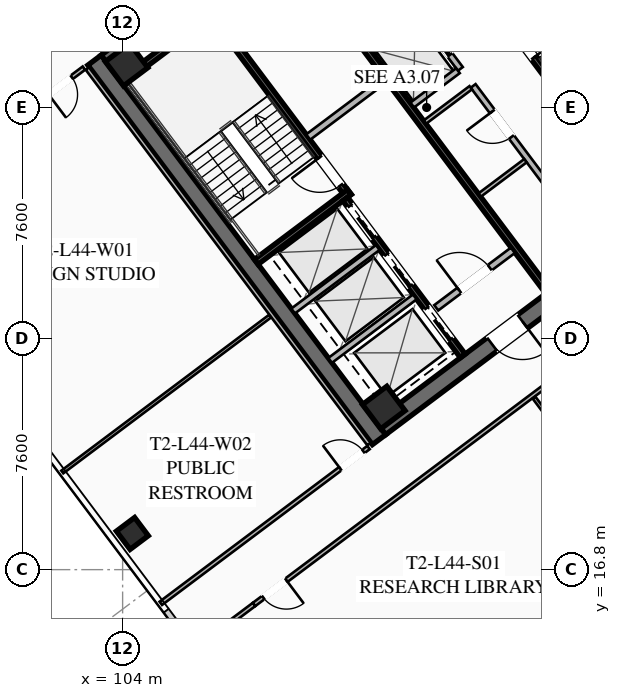
"""IFC4 building model, lengths in metres.
Left out: names, types, materials, properties, quantities, classifications, styles, units other than length and angle.
Written with IfcOpenShell. Run it as: python <this file> out.ifc"""

import sys

from ifc_helpers import new_model, si_unit, direction, frame, frame_2d, origin, origin_2d, place, context, subcontext, project, spatial, rectangle, hollow_rectangle, extrude, element, fill, save


model = new_model("IFC4")
c1 = context("Model", 3, precision=1e-05, world=origin(), true_north=direction((0.0, 1.0)))
c2 = subcontext(c1, "Body", "Model", "MODEL_VIEW")
j1 = project(units=[si_unit("LENGTHUNIT", "METRE"), si_unit("PLANEANGLEUNIT", "RADIAN")], contexts=[c1])
p1 = place(None, origin())
s1 = spatial("IfcSite", under=j1, at=p1, CompositionType="ELEMENT")
p2 = place(p1, origin())
s2 = spatial("IfcBuilding", under=s1, at=p2, CompositionType="ELEMENT")
p3 = place(p2, frame((0.0, 0.0, 164.1)))
s3 = spatial("IfcBuildingStorey", under=s2, at=p3, CompositionType="ELEMENT", Elevation=164.1)
for number, where, z_axis, x_axis in (
    (1, (112.436, 21.077, 0.0), (0.0, 0.0, 1.0), (-0.6, 0.8, 0.0)),
    (2, (115.564, 42.923, 0.0), (0.0, 0.0, 1.0), (0.6, -0.8, 0.0)),
):
    element("IfcWall", number, at=place(p3, frame(where, z_axis=z_axis, x_axis=x_axis)), inside=s3, PredefinedType="SHEAR", context=c2, shape_type="SweptSolid", body=[
        extrude(rectangle(XDim=15.6, YDim=0.55, at=frame_2d((7.8, 0.0))), origin(), (0.0, 0.0, 1.0), 3.55),
    ])
p4 = place(p3, frame((124.539, 30.498, 0.0), z_axis=(0.0, 0.0, 1.0), x_axis=(-0.799998054672, -0.600002593761, 0.0)))
e3 = element("IfcWall", 3, at=p4, inside=s3, PredefinedType="SHEAR", context=c2, shape_type="SweptSolid", body=[
    extrude(rectangle(XDim=15.06, YDim=0.55, at=frame_2d((7.53, 0.0))), origin(), (0.0, 0.0, 1.0), 3.55),
])
p5 = place(p4, frame((9.23, 0.0, 0.0)))
e4 = element("IfcOpeningElement", 4, at=p5, cuts=e3, PredefinedType="OPENING", context=c2, shape_type="SweptSolid", body=[
    extrude(rectangle(XDim=1.25, YDim=2.25, at=frame_2d((0.625, 1.125))), frame((0.0, 0.285, 0.0), z_axis=(0.0, -1.0, 0.0), x_axis=(1.0, 0.0, 0.0)), (0.0, 0.0, 1.0), 0.57),
])
p6 = place(p4, frame((4.18, 0.0, 0.0)))
e5 = element("IfcOpeningElement", 5, at=p6, cuts=e3, PredefinedType="OPENING", context=c2, shape_type="SweptSolid", body=[
    extrude(rectangle(XDim=1.25, YDim=2.25, at=frame_2d((0.625, 1.125))), frame((0.0, 0.285, 0.0), z_axis=(0.0, -1.0, 0.0), x_axis=(1.0, 0.0, 0.0)), (0.0, 0.0, 1.0), 0.57),
])
p7 = place(p3, frame((103.461, 33.502, 0.0), z_axis=(0.0, 0.0, 1.0), x_axis=(0.799998054672, 0.600002593761, 0.0)))
e6 = element("IfcWall", 6, at=p7, inside=s3, PredefinedType="SHEAR", context=c2, shape_type="SweptSolid", body=[
    extrude(rectangle(XDim=15.06, YDim=0.55, at=frame_2d((7.53, 0.0))), origin(), (0.0, 0.0, 1.0), 3.55),
])
p8 = place(p7, frame((4.58, 0.0, 0.0)))
e7 = element("IfcOpeningElement", 7, at=p8, cuts=e6, PredefinedType="OPENING", context=c2, shape_type="SweptSolid", body=[
    extrude(rectangle(XDim=1.25, YDim=2.25, at=frame_2d((0.625, 1.125))), frame((0.0, 0.285, 0.0), z_axis=(0.0, -1.0, 0.0), x_axis=(1.0, 0.0, 0.0)), (0.0, 0.0, 1.0), 0.57),
])
p9 = place(p7, frame((9.63, 0.0, 0.0)))
e8 = element("IfcOpeningElement", 8, at=p9, cuts=e6, PredefinedType="OPENING", context=c2, shape_type="SweptSolid", body=[
    extrude(rectangle(XDim=1.25, YDim=2.25, at=frame_2d((0.625, 1.125))), frame((0.0, 0.285, 0.0), z_axis=(0.0, -1.0, 0.0), x_axis=(1.0, 0.0, 0.0)), (0.0, 0.0, 1.0), 0.57),
])
for number, where, z_axis, x_axis in (
    (9, (112.59, 22.13, 0.0), (0.0, 0.0, 1.0), (0.8, 0.6, 0.0)),
    (10, (104.13, 33.41, 0.0), (0.0, 0.0, 1.0), (0.8, 0.6, 0.0)),
):
    element("IfcColumn", number, at=place(p3, frame(where, z_axis=z_axis, x_axis=x_axis)), inside=s3, PredefinedType="COLUMN", context=c2, shape_type="SweptSolid", body=[
        extrude(hollow_rectangle(XDim=1.0, YDim=1.0, WallThickness=0.04, at=origin_2d()), origin(), (0.0, 0.0, 1.0), 3.37),
    ])
p10 = place(p3, frame((104.32, 17.99, 0.0), z_axis=(0.0, 0.0, 1.0), x_axis=(0.799999996291, 0.600000004945, 0.0)))
e11 = element("IfcColumn", 11, at=p10, inside=s3, PredefinedType="COLUMN", context=c2, shape_type="SweptSolid", body=[
    extrude(hollow_rectangle(XDim=0.75, YDim=0.75, WallThickness=0.032, at=origin_2d()), origin(), (0.0, 0.0, 1.0), 3.37),
])
p11 = place(p3, frame((111.44, 29.08, 0.0), z_axis=(0.0, 0.0, 1.0), x_axis=(-0.59999029481, 0.8000072788, 0.0)))
e12 = element("IfcWall", 12, at=p11, inside=s3, PredefinedType="SHEAR", context=c2, shape_type="SweptSolid", body=[
    extrude(rectangle(XDim=8.05, YDim=0.2, at=frame_2d((4.025, 0.0))), origin(), (0.0, 0.0, 1.0), 3.37),
])
p12 = place(p11, frame((0.45, 0.0, 0.0)))
e13 = element("IfcOpeningElement", 13, at=p12, cuts=e12, PredefinedType="OPENING", context=c2, shape_type="SweptSolid", body=[
    extrude(rectangle(XDim=1.15, YDim=2.2, at=frame_2d((0.575, 1.1))), frame((0.0, 0.11, 0.0), z_axis=(0.0, -1.0, 0.0), x_axis=(1.0, 0.0, 0.0)), (0.0, 0.0, 1.0), 0.22),
])
for number, where, z_axis, x_axis in (
    (14, (108.396, 26.922, 0.0), (0.0, 0.0, 1.0), (0.8, 0.6, 0.0)),
    (15, (103.956, 32.842, 0.0), (0.0, 0.0, 1.0), (0.8, 0.6, 0.0)),
):
    element("IfcWall", number, at=place(p3, frame(where, z_axis=z_axis, x_axis=x_axis)), inside=s3, PredefinedType="SHEAR", context=c2, shape_type="SweptSolid", body=[
        extrude(rectangle(XDim=3.83, YDim=0.2, at=frame_2d((1.915, 0.0))), origin(), (0.0, 0.0, 1.0), 3.37),
    ])
p13 = place(p3, frame((116.56, 34.92, 0.0), z_axis=(0.0, 0.0, 1.0), x_axis=(0.59999029481, -0.8000072788, 0.0)))
e16 = element("IfcWall", 16, at=p13, inside=s3, PredefinedType="SHEAR", context=c2, shape_type="SweptSolid", body=[
    extrude(rectangle(XDim=8.05, YDim=0.2, at=frame_2d((4.025, 0.0))), origin(), (0.0, 0.0, 1.0), 3.37),
])
p14 = place(p13, frame((0.45, 0.0, 0.0)))
e17 = element("IfcOpeningElement", 17, at=p14, cuts=e16, PredefinedType="OPENING", context=c2, shape_type="SweptSolid", body=[
    extrude(rectangle(XDim=1.15, YDim=2.2, at=frame_2d((0.575, 1.1))), frame((0.0, 0.11, 0.0), z_axis=(0.0, -1.0, 0.0), x_axis=(1.0, 0.0, 0.0)), (0.0, 0.0, 1.0), 0.22),
])
p15 = place(p3, frame((117.998, 25.936, 0.0), z_axis=(0.0, 0.0, 1.0), x_axis=(-0.600002693989, 0.799997979501, 0.0)))
e18 = element("IfcWall", 18, at=p15, inside=s3, PredefinedType="SHEAR", context=c2, shape_type="SweptSolid", body=[
    extrude(rectangle(XDim=14.5, YDim=0.2, at=frame_2d((7.25, 0.0))), origin(), (0.0, 0.0, 1.0), 3.37),
])
p16 = place(p3, frame((110.104, 31.028, 0.0), z_axis=(0.0, 0.0, 1.0), x_axis=(0.800018601094, 0.59997519774, 0.0)))
e19 = element("IfcWall", 19, at=p16, inside=s3, PredefinedType="SOLIDWALL", context=c2, shape_type="SweptSolid", body=[
    extrude(rectangle(XDim=3.15, YDim=0.22, at=frame_2d((1.575, 0.0))), origin(), (0.0, 0.0, 1.0), 2.723),
])
p17 = place(p3, frame((114.316, 25.412, 0.0), z_axis=(0.0, 0.0, 1.0), x_axis=(0.800018601094, 0.59997519774, 0.0)))
e20 = element("IfcWall", 20, at=p17, inside=s3, PredefinedType="SOLIDWALL", context=c2, shape_type="SweptSolid", body=[
    extrude(rectangle(XDim=3.15, YDim=0.22, at=frame_2d((1.575, 0.0))), origin(), (0.0, 0.0, 1.0), 2.723),
])
p18 = place(p17, frame((0.95, 0.0, 0.0)))
e21 = element("IfcOpeningElement", 21, at=p18, cuts=e20, PredefinedType="OPENING", context=c2, shape_type="SweptSolid", body=[
    extrude(rectangle(XDim=1.25, YDim=2.25, at=frame_2d((0.625, 1.125))), frame((0.0, 0.12, 0.0), z_axis=(0.0, -1.0, 0.0), x_axis=(1.0, 0.0, 0.0)), (0.0, 0.0, 1.0), 0.24),
])
p19 = place(p3, frame((115.19, 23.83, 0.0), z_axis=(0.0, 0.0, 1.0), x_axis=(-0.599993943644, 0.800004542231, 0.0)))
e22 = element("IfcWall", 22, at=p19, inside=s3, PredefinedType="SHEAR", context=c2, shape_type="SweptSolid", body=[
    extrude(rectangle(XDim=6.45, YDim=0.2, at=frame_2d((3.225, 0.0))), origin(), (0.0, 0.0, 1.0), 3.37),
])
p20 = place(p19, frame((4.875, 0.0, 0.0)))
e23 = element("IfcOpeningElement", 23, at=p20, cuts=e22, PredefinedType="OPENING", context=c2, shape_type="SweptSolid", body=[
    extrude(rectangle(XDim=1.3, YDim=2.25, at=frame_2d((0.65, 1.125))), frame((0.0, 0.11, 0.0), z_axis=(0.0, -1.0, 0.0), x_axis=(1.0, 0.0, 0.0)), (0.0, 0.0, 1.0), 0.22),
])
p21 = place(p19, frame((2.875, 0.0, 0.0)))
e24 = element("IfcOpeningElement", 24, at=p21, cuts=e22, PredefinedType="OPENING", context=c2, shape_type="SweptSolid", body=[
    extrude(rectangle(XDim=1.3, YDim=2.25, at=frame_2d((0.65, 1.125))), frame((0.0, 0.11, 0.0), z_axis=(0.0, -1.0, 0.0), x_axis=(1.0, 0.0, 0.0)), (0.0, 0.0, 1.0), 0.22),
])
p22 = place(p19, frame((0.675, 0.0, 0.0)))
e25 = element("IfcOpeningElement", 25, at=p22, cuts=e22, PredefinedType="OPENING", context=c2, shape_type="SweptSolid", body=[
    extrude(rectangle(XDim=1.3, YDim=2.25, at=frame_2d((0.65, 1.125))), frame((0.0, 0.11, 0.0), z_axis=(0.0, -1.0, 0.0), x_axis=(1.0, 0.0, 0.0)), (0.0, 0.0, 1.0), 0.22),
])
for number, where, z_axis, x_axis in (
    (26, (110.826, 23.682, 0.0), (0.0, 0.0, 1.0), (0.8, 0.6, 0.0)),
    (27, (109.608, 25.306, 0.0), (0.0, 0.0, 1.0), (0.8, 0.6, 0.0)),
):
    element("IfcWall", number, at=place(p3, frame(where, z_axis=z_axis, x_axis=x_axis)), inside=s3, PredefinedType="SOLIDWALL", context=c2, shape_type="SweptSolid", body=[
        extrude(rectangle(XDim=3.48, YDim=0.2, at=frame_2d((1.74, 0.0))), origin(), (0.0, 0.0, 1.0), 3.37),
    ])
p23 = place(p3, frame((119.67, 27.19, 0.0), z_axis=(0.0, 0.0, 1.0), x_axis=(-0.599988677396, 0.800008491828, 0.0)))
e28 = element("IfcWall", 28, at=p23, inside=s3, PredefinedType="SOLIDWALL", context=c2, shape_type="SweptSolid", body=[
    extrude(rectangle(XDim=6.9, YDim=0.2, at=frame_2d((3.45, 0.0))), origin(), (0.0, 0.0, 1.0), 2.723),
])
p24 = place(p23, frame((0.85, 0.0, 0.0)))
e29 = element("IfcOpeningElement", 29, at=p24, cuts=e28, PredefinedType="OPENING", context=c2, shape_type="SweptSolid", body=[
    extrude(rectangle(XDim=0.95, YDim=2.05, at=frame_2d((0.475, 1.025))), frame((0.0, 0.11, 0.0), z_axis=(0.0, -1.0, 0.0), x_axis=(1.0, 0.0, 0.0)), (0.0, 0.0, 1.0), 0.22),
])
p25 = place(p23, frame((4.8, 0.0, 0.0)))
e30 = element("IfcOpeningElement", 30, at=p25, cuts=e28, PredefinedType="OPENING", context=c2, shape_type="SweptSolid", body=[
    extrude(rectangle(XDim=1.05, YDim=2.2, at=frame_2d((0.525, 1.1))), frame((0.0, 0.11, 0.0), z_axis=(0.0, -1.0, 0.0), x_axis=(1.0, 0.0, 0.0)), (0.0, 0.0, 1.0), 0.22),
])
for number, where, z_axis, x_axis in (
    (31, (113.946, 31.522, 0.0), (0.0, 0.0, 1.0), (0.8, 0.6, 0.0)),
    (32, (115.746, 29.122, 0.0), (0.0, 0.0, 1.0), (0.8, 0.6, 0.0)),
):
    element("IfcWall", number, at=place(p3, frame(where, z_axis=z_axis, x_axis=x_axis)), inside=s3, PredefinedType="PARTITIONING", context=c2, shape_type="SweptSolid", body=[
        extrude(rectangle(XDim=1.88, YDim=0.135, at=frame_2d((0.94, 0.0))), origin(), (0.0, 0.0, 1.0), 2.723),
    ])
p26 = place(p3, frame((115.11, 33.27, 0.0), z_axis=(0.0, 0.0, 1.0), x_axis=(-0.600011322243, 0.799991508192, 0.0)))
e33 = element("IfcWall", 33, at=p26, inside=s3, PredefinedType="SOLIDWALL", context=c2, shape_type="SweptSolid", body=[
    extrude(rectangle(XDim=6.9, YDim=0.2, at=frame_2d((3.45, 0.0))), origin(), (0.0, 0.0, 1.0), 3.37),
])
p27 = place(p26, frame((0.575, 0.0, 0.0)))
e34 = element("IfcOpeningElement", 34, at=p27, cuts=e33, PredefinedType="OPENING", context=c2, shape_type="SweptSolid", body=[
    extrude(rectangle(XDim=1.1, YDim=2.2, at=frame_2d((0.55, 1.1))), frame((0.0, 0.11, 0.0), z_axis=(0.0, -1.0, 0.0), x_axis=(1.0, 0.0, 0.0)), (0.0, 0.0, 1.0), 0.22),
])
p28 = place(p26, frame((2.825, 0.0, 0.0)))
e35 = element("IfcOpeningElement", 35, at=p28, cuts=e33, PredefinedType="OPENING", context=c2, shape_type="SweptSolid", body=[
    extrude(rectangle(XDim=1.1, YDim=2.2, at=frame_2d((0.55, 1.1))), frame((0.0, 0.11, 0.0), z_axis=(0.0, -1.0, 0.0), x_axis=(1.0, 0.0, 0.0)), (0.0, 0.0, 1.0), 0.22),
])
p29 = place(p26, frame((5.075, 0.0, 0.0)))
e36 = element("IfcOpeningElement", 36, at=p29, cuts=e33, PredefinedType="OPENING", context=c2, shape_type="SweptSolid", body=[
    extrude(rectangle(XDim=1.1, YDim=2.2, at=frame_2d((0.55, 1.1))), frame((0.0, 0.11, 0.0), z_axis=(0.0, -1.0, 0.0), x_axis=(1.0, 0.0, 0.0)), (0.0, 0.0, 1.0), 0.22),
])
p30 = place(p3, frame((113.526, 32.082, 0.0), z_axis=(0.0, 0.0, 1.0), x_axis=(0.800046745961, 0.599937666993, 0.0)))
e37 = element("IfcWall", 37, at=p30, inside=s3, PredefinedType="SOLIDWALL", context=c2, shape_type="SweptSolid", body=[
    extrude(rectangle(XDim=1.88, YDim=0.2, at=frame_2d((0.94, 0.0))), origin(), (0.0, 0.0, 1.0), 3.37),
])
p31 = place(p3, frame((112.176, 33.882, 0.0), z_axis=(0.0, 0.0, 1.0), x_axis=(0.8, 0.6, 0.0)))
e38 = element("IfcWall", 38, at=p31, inside=s3, PredefinedType="SOLIDWALL", context=c2, shape_type="SweptSolid", body=[
    extrude(rectangle(XDim=1.88, YDim=0.2, at=frame_2d((0.94, 0.0))), origin(), (0.0, 0.0, 1.0), 3.37),
])
p32 = place(p3, frame((95.8, 32.35, 0.0), z_axis=(0.0, 0.0, 1.0), x_axis=(0.8, 0.6, 0.0)))
e39 = element("IfcWall", 39, at=p32, inside=s3, PredefinedType="PARTITIONING", context=c2, shape_type="SweptSolid", body=[
    extrude(rectangle(XDim=28.7, YDim=0.135, at=frame_2d((14.35, 0.0))), origin(), (0.0, 0.0, 1.0), 2.723),
])
p33 = place(p32, frame((0.3, 0.0, 0.0)))
e40 = element("IfcOpeningElement", 40, at=p33, cuts=e39, PredefinedType="OPENING", context=c2, shape_type="SweptSolid", body=[
    extrude(rectangle(XDim=0.95, YDim=2.05, at=frame_2d((0.475, 1.025))), frame((0.0, 0.077, 0.0), z_axis=(0.0, -1.0, 0.0), x_axis=(1.0, 0.0, 0.0)), (0.0, 0.0, 1.0), 0.155),
])
p34 = place(p32, frame((9.959, 0.0, 0.0)))
e41 = element("IfcOpeningElement", 41, at=p34, cuts=e39, PredefinedType="OPENING", context=c2, shape_type="SweptSolid", body=[
    extrude(rectangle(XDim=0.95, YDim=2.05, at=frame_2d((0.475, 1.025))), frame((0.0, 0.077, 0.0), z_axis=(0.0, -1.0, 0.0), x_axis=(1.0, 0.0, 0.0)), (0.0, 0.0, 1.0), 0.155),
])
p35 = place(p32, frame((14.005, 0.0, 0.0)))
e42 = element("IfcOpeningElement", 42, at=p35, cuts=e39, PredefinedType="OPENING", context=c2, shape_type="SweptSolid", body=[
    extrude(rectangle(XDim=0.95, YDim=2.05, at=frame_2d((0.475, 1.025))), frame((0.0, 0.077, 0.0), z_axis=(0.0, -1.0, 0.0), x_axis=(1.0, 0.0, 0.0)), (0.0, 0.0, 1.0), 0.155),
])
p36 = place(p32, frame((18.049, 0.0, 0.0)))
e43 = element("IfcOpeningElement", 43, at=p36, cuts=e39, PredefinedType="OPENING", context=c2, shape_type="SweptSolid", body=[
    extrude(rectangle(XDim=0.95, YDim=2.05, at=frame_2d((0.475, 1.025))), frame((0.0, 0.077, 0.0), z_axis=(0.0, -1.0, 0.0), x_axis=(1.0, 0.0, 0.0)), (0.0, 0.0, 1.0), 0.155),
])
p37 = place(p32, frame((27.45, 0.0, 0.0)))
e44 = element("IfcOpeningElement", 44, at=p37, cuts=e39, PredefinedType="OPENING", context=c2, shape_type="SweptSolid", body=[
    extrude(rectangle(XDim=0.95, YDim=2.05, at=frame_2d((0.475, 1.025))), frame((0.0, 0.077, 0.0), z_axis=(0.0, -1.0, 0.0), x_axis=(1.0, 0.0, 0.0)), (0.0, 0.0, 1.0), 0.155),
])
p38 = place(p3, frame((131.282, 32.874, 0.0), z_axis=(0.0, 0.0, 1.0), x_axis=(-0.8, -0.6, 0.0)))
e45 = element("IfcWall", 45, at=p38, inside=s3, PredefinedType="PARTITIONING", context=c2, shape_type="SweptSolid", body=[
    extrude(rectangle(XDim=28.7, YDim=0.135, at=frame_2d((14.35, 0.0))), origin(), (0.0, 0.0, 1.0), 2.723),
])
p39 = place(p38, frame((27.37, 0.0, 0.0)))
e46 = element("IfcOpeningElement", 46, at=p39, cuts=e45, PredefinedType="OPENING", context=c2, shape_type="SweptSolid", body=[
    extrude(rectangle(XDim=0.95, YDim=2.05, at=frame_2d((0.475, 1.025))), frame((0.0, 0.077, 0.0), z_axis=(0.0, -1.0, 0.0), x_axis=(1.0, 0.0, 0.0)), (0.0, 0.0, 1.0), 0.155),
])
p40 = place(p38, frame((13.592, 0.0, 0.0)))
e47 = element("IfcOpeningElement", 47, at=p40, cuts=e45, PredefinedType="OPENING", context=c2, shape_type="SweptSolid", body=[
    extrude(rectangle(XDim=0.95, YDim=2.05, at=frame_2d((0.475, 1.025))), frame((0.0, 0.077, 0.0), z_axis=(0.0, -1.0, 0.0), x_axis=(1.0, 0.0, 0.0)), (0.0, 0.0, 1.0), 0.155),
])
p41 = place(p38, frame((0.38, 0.0, 0.0)))
e48 = element("IfcOpeningElement", 48, at=p41, cuts=e45, PredefinedType="OPENING", context=c2, shape_type="SweptSolid", body=[
    extrude(rectangle(XDim=0.95, YDim=2.05, at=frame_2d((0.475, 1.025))), frame((0.0, 0.077, 0.0), z_axis=(0.0, -1.0, 0.0), x_axis=(1.0, 0.0, 0.0)), (0.0, 0.0, 1.0), 0.155),
])
p42 = place(p3, frame((106.378, 14.196, 0.0), z_axis=(0.0, 0.0, 1.0), x_axis=(0.800012055778, 0.599983925293, 0.0)))
e49 = element("IfcWall", 49, at=p42, inside=s3, PredefinedType="PARTITIONING", context=c2, shape_type="SweptSolid", body=[
    extrude(rectangle(XDim=2.43, YDim=0.135, at=frame_2d((1.215, 0.0))), origin(), (0.0, 0.0, 1.0), 2.723),
])
p43 = place(p3, frame((121.748, 16.836, 0.0), z_axis=(0.0, 0.0, 1.0), x_axis=(-0.6, 0.8, 0.0)))
e50 = element("IfcWall", 50, at=p43, inside=s3, PredefinedType="PARTITIONING", context=c2, shape_type="SweptSolid", body=[
    extrude(rectangle(XDim=7.03, YDim=0.11, at=frame_2d((3.515, 0.0))), origin(), (0.0, 0.0, 1.0), 2.723),
])
p44 = place(p3, frame((112.104, 20.928, 0.0), z_axis=(0.0, 0.0, 1.0), x_axis=(-0.599994940075, 0.800003794918, 0.0)))
e51 = element("IfcWall", 51, at=p44, inside=s3, PredefinedType="PARTITIONING", context=c2, shape_type="SweptSolid", body=[
    extrude(rectangle(XDim=15.44, YDim=0.135, at=frame_2d((7.72, 0.0))), origin(), (0.0, 0.0, 1.0), 2.723),
])
p45 = place(p3, frame((102.728, 33.296, 0.0), z_axis=(0.0, 0.0, 1.0), x_axis=(-0.800013722153, -0.59998170336, 0.0)))
e52 = element("IfcWall", 52, at=p45, inside=s3, PredefinedType="PARTITIONING", context=c2, shape_type="SweptSolid", body=[
    extrude(rectangle(XDim=8.54, YDim=0.135, at=frame_2d((4.27, 0.0))), origin(), (0.0, 0.0, 1.0), 2.723),
])
p46 = place(p45, frame((0.5, 0.0, 0.0)))
e53 = element("IfcOpeningElement", 53, at=p46, cuts=e52, PredefinedType="OPENING", context=c2, shape_type="SweptSolid", body=[
    extrude(rectangle(XDim=0.95, YDim=2.05, at=frame_2d((0.475, 1.025))), frame((0.0, 0.077, 0.0), z_axis=(0.0, -1.0, 0.0), x_axis=(1.0, 0.0, 0.0)), (0.0, 0.0, 1.0), 0.155),
])
p47 = place(p3, frame((105.256, 15.692, 0.0), z_axis=(0.0, 0.0, 1.0), x_axis=(0.799989708052, 0.600013722352, 0.0)))
e54 = element("IfcWall", 54, at=p47, inside=s3, PredefinedType="PARTITIONING", context=c2, shape_type="SweptSolid", body=[
    extrude(rectangle(XDim=8.54, YDim=0.135, at=frame_2d((4.27, 0.0))), origin(), (0.0, 0.0, 1.0), 2.723),
])
p48 = place(p47, frame((7.38, 0.0, 0.0)))
e55 = element("IfcOpeningElement", 55, at=p48, cuts=e54, PredefinedType="OPENING", context=c2, shape_type="SweptSolid", body=[
    extrude(rectangle(XDim=0.95, YDim=2.05, at=frame_2d((0.475, 1.025))), frame((0.0, 0.077, 0.0), z_axis=(0.0, -1.0, 0.0), x_axis=(1.0, 0.0, 0.0)), (0.0, 0.0, 1.0), 0.155),
])
p49 = place(p3, frame((102.016, 20.012, 0.0), z_axis=(0.0, 0.0, 1.0), x_axis=(0.799989708052, 0.600013722352, 0.0)))
e56 = element("IfcWall", 56, at=p49, inside=s3, PredefinedType="PARTITIONING", context=c2, shape_type="SweptSolid", body=[
    extrude(rectangle(XDim=8.54, YDim=0.11, at=frame_2d((4.27, 0.0))), origin(), (0.0, 0.0, 1.0), 2.723),
])
p50 = place(p5, origin())
e57 = element("IfcDoor", 57, at=p50, inside=s3, OperationType="SINGLE_SWING_LEFT", PredefinedType="DOOR", context=c2, shape_type="SweptSolid", body=[
    extrude(rectangle(XDim=1.25, YDim=2.25, at=frame_2d((0.625, 1.125))), frame((0.0, 0.025, 0.0), z_axis=(0.0, -1.0, 0.0), x_axis=(1.0, 0.0, 0.0)), (0.0, 0.0, 1.0), 0.05),
])
fill(e4, e57)
p51 = place(p12, origin())
e58 = element("IfcDoor", 58, at=p51, inside=s3, OperationType="SINGLE_SWING_RIGHT", PredefinedType="DOOR", context=c2, shape_type="SweptSolid", body=[
    extrude(rectangle(XDim=1.15, YDim=2.2, at=frame_2d((0.575, 1.1))), frame((0.0, 0.025, 0.0), z_axis=(0.0, -1.0, 0.0), x_axis=(1.0, 0.0, 0.0)), (0.0, 0.0, 1.0), 0.05),
])
fill(e13, e58)
p52 = place(p14, origin())
e59 = element("IfcDoor", 59, at=p52, inside=s3, OperationType="SINGLE_SWING_RIGHT", PredefinedType="DOOR", context=c2, shape_type="SweptSolid", body=[
    extrude(rectangle(XDim=1.15, YDim=2.2, at=frame_2d((0.575, 1.1))), frame((0.0, 0.025, 0.0), z_axis=(0.0, -1.0, 0.0), x_axis=(1.0, 0.0, 0.0)), (0.0, 0.0, 1.0), 0.05),
])
fill(e17, e59)
p53 = place(p18, origin())
e60 = element("IfcDoor", 60, at=p53, inside=s3, OperationType="SINGLE_SWING_LEFT", PredefinedType="DOOR", context=c2, shape_type="SweptSolid", body=[
    extrude(rectangle(XDim=1.25, YDim=2.25, at=frame_2d((0.625, 1.125))), frame((0.0, 0.025, 0.0), z_axis=(0.0, -1.0, 0.0), x_axis=(1.0, 0.0, 0.0)), (0.0, 0.0, 1.0), 0.05),
])
fill(e21, e60)
p54 = place(p25, origin())
e61 = element("IfcDoor", 61, at=p54, inside=s3, OperationType="SINGLE_SWING_RIGHT", PredefinedType="DOOR", context=c2, shape_type="SweptSolid", body=[
    extrude(rectangle(XDim=1.05, YDim=2.2, at=frame_2d((0.525, 1.1))), frame((0.0, 0.025, 0.0), z_axis=(0.0, -1.0, 0.0), x_axis=(1.0, 0.0, 0.0)), (0.0, 0.0, 1.0), 0.05),
])
fill(e30, e61)
p55 = place(p39, origin())
e62 = element("IfcDoor", 62, at=p55, inside=s3, OperationType="SINGLE_SWING_LEFT", PredefinedType="DOOR", context=c2, shape_type="SweptSolid", body=[
    extrude(rectangle(XDim=0.95, YDim=2.05, at=frame_2d((0.475, 1.025))), frame((0.0, 0.025, 0.0), z_axis=(0.0, -1.0, 0.0), x_axis=(1.0, 0.0, 0.0)), (0.0, 0.0, 1.0), 0.05),
])
fill(e46, e62)
p56 = place(p46, origin())
e63 = element("IfcDoor", 63, at=p56, inside=s3, OperationType="SINGLE_SWING_RIGHT", PredefinedType="DOOR", context=c2, shape_type="SweptSolid", body=[
    extrude(rectangle(XDim=0.95, YDim=2.05, at=frame_2d((0.475, 1.025))), frame((0.0, 0.025, 0.0), z_axis=(0.0, -1.0, 0.0), x_axis=(1.0, 0.0, 0.0)), (0.0, 0.0, 1.0), 0.05),
])
fill(e53, e63)
p57 = place(p48, origin())
e64 = element("IfcDoor", 64, at=p57, inside=s3, OperationType="SINGLE_SWING_LEFT", PredefinedType="DOOR", context=c2, shape_type="SweptSolid", body=[
    extrude(rectangle(XDim=0.95, YDim=2.05, at=frame_2d((0.475, 1.025))), frame((0.0, 0.025, 0.0), z_axis=(0.0, -1.0, 0.0), x_axis=(1.0, 0.0, 0.0)), (0.0, 0.0, 1.0), 0.05),
])
fill(e55, e64)
p58 = place(p20, origin())
e65 = element("IfcDoor", 65, at=p58, inside=s3, OperationType="SLIDING_TO_LEFT", PredefinedType="DOOR", context=c2, shape_type="SweptSolid", body=[
    extrude(rectangle(XDim=1.3, YDim=2.25, at=frame_2d((0.65, 1.125))), frame((0.0, 0.025, 0.0), z_axis=(0.0, -1.0, 0.0), x_axis=(1.0, 0.0, 0.0)), (0.0, 0.0, 1.0), 0.05),
])
fill(e23, e65)
p59 = place(p21, origin())
e66 = element("IfcDoor", 66, at=p59, inside=s3, OperationType="SLIDING_TO_LEFT", PredefinedType="DOOR", context=c2, shape_type="SweptSolid", body=[
    extrude(rectangle(XDim=1.3, YDim=2.25, at=frame_2d((0.65, 1.125))), frame((0.0, 0.025, 0.0), z_axis=(0.0, -1.0, 0.0), x_axis=(1.0, 0.0, 0.0)), (0.0, 0.0, 1.0), 0.05),
])
fill(e24, e66)
p60 = place(p22, origin())
e67 = element("IfcDoor", 67, at=p60, inside=s3, OperationType="SLIDING_TO_LEFT", PredefinedType="DOOR", context=c2, shape_type="SweptSolid", body=[
    extrude(rectangle(XDim=1.3, YDim=2.25, at=frame_2d((0.65, 1.125))), frame((0.0, 0.025, 0.0), z_axis=(0.0, -1.0, 0.0), x_axis=(1.0, 0.0, 0.0)), (0.0, 0.0, 1.0), 0.05),
])
fill(e25, e67)
p61 = place(p27, origin())
e68 = element("IfcDoor", 68, at=p61, inside=s3, OperationType="SLIDING_TO_LEFT", PredefinedType="DOOR", context=c2, shape_type="SweptSolid", body=[
    extrude(rectangle(XDim=1.1, YDim=2.2, at=frame_2d((0.55, 1.1))), frame((0.0, 0.025, 0.0), z_axis=(0.0, -1.0, 0.0), x_axis=(1.0, 0.0, 0.0)), (0.0, 0.0, 1.0), 0.05),
])
fill(e34, e68)
save(model, sys.argv[1])
